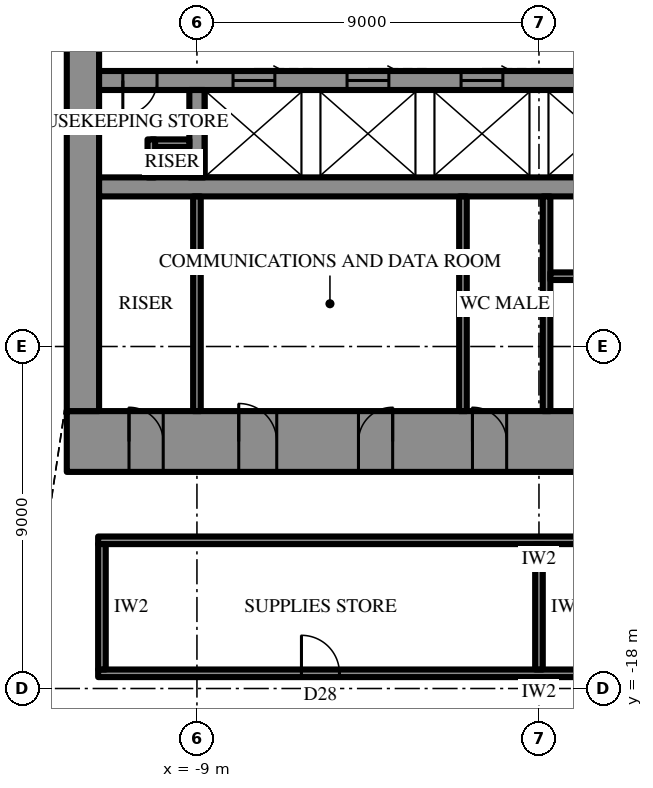
"""IFC4 building model, lengths in metres.
Left out: names, types, materials, properties, quantities, classifications, styles, units other than length and angle.
Written with IfcOpenShell. Run it as: python <this file> out.ifc"""

import sys

from ifc_helpers import new_model, si_unit, direction, frame, frame_2d, origin, place, context, subcontext, project, spatial, rectangle, extrude, element, fill, save


model = new_model("IFC4")
c1 = context("Model", 3, precision=1e-05, world=origin(), true_north=direction((0.0, 1.0)))
c2 = subcontext(c1, "Body", "Model", "MODEL_VIEW")
j1 = project(units=[si_unit("LENGTHUNIT", "METRE"), si_unit("PLANEANGLEUNIT", "RADIAN")], contexts=[c1])
p1 = place(None, origin())
s1 = spatial("IfcSite", under=j1, at=p1, CompositionType="ELEMENT")
p2 = place(p1, origin())
s2 = spatial("IfcBuilding", under=s1, at=p2, CompositionType="ELEMENT")
p3 = place(p2, frame((0.0, 0.0, 349.3)))
s3 = spatial("IfcBuildingStorey", under=s2, at=p3, CompositionType="ELEMENT", Elevation=349.3)
p4 = place(p3, frame((12.425, -11.5, 0.0), z_axis=(0.0, 0.0, 1.0), x_axis=(-1.0, 0.0, 0.0)))
e1 = element("IfcWall", 1, at=p4, inside=s3, PredefinedType="SHEAR", context=c2, shape_type="SweptSolid", body=[
    extrude(rectangle(XDim=24.85, YDim=1.6, at=frame_2d((12.425, 0.0))), origin(), (0.0, 0.0, 1.0), 4.2),
])
p5 = place(p4, frame((13.275, 0.0, 0.0)))
e2 = element("IfcOpeningElement", 2, at=p5, cuts=e1, PredefinedType="OPENING", context=c2, shape_type="SweptSolid", body=[
    extrude(rectangle(XDim=0.9, YDim=2.2, at=frame_2d((0.45, 1.1))), frame((0.0, 0.81, 0.0), z_axis=(0.0, -1.0, 0.0), x_axis=(1.0, 0.0, 0.0)), (0.0, 0.0, 1.0), 1.62),
])
p6 = place(p4, frame((16.275, 0.0, 0.0)))
e3 = element("IfcOpeningElement", 3, at=p6, cuts=e1, PredefinedType="OPENING", context=c2, shape_type="SweptSolid", body=[
    extrude(rectangle(XDim=0.9, YDim=2.2, at=frame_2d((0.45, 1.1))), frame((0.0, 0.81, 0.0), z_axis=(0.0, -1.0, 0.0), x_axis=(1.0, 0.0, 0.0)), (0.0, 0.0, 1.0), 1.62),
])
p7 = place(p4, frame((19.325, 0.0, 0.0)))
e4 = element("IfcOpeningElement", 4, at=p7, cuts=e1, PredefinedType="OPENING", context=c2, shape_type="SweptSolid", body=[
    extrude(rectangle(XDim=1.0, YDim=2.2, at=frame_2d((0.5, 1.1))), frame((0.0, 0.81, 0.0), z_axis=(0.0, -1.0, 0.0), x_axis=(1.0, 0.0, 0.0)), (0.0, 0.0, 1.0), 1.62),
])
p8 = place(p4, frame((1.637, 0.0, 0.0)))
e5 = element("IfcOpeningElement", 5, at=p8, cuts=e1, PredefinedType="OPENING", context=c2, shape_type="SweptSolid", body=[
    extrude(rectangle(XDim=0.9, YDim=2.2, at=frame_2d((0.45, 1.1))), frame((0.0, 0.81, 0.0), z_axis=(0.0, -1.0, 0.0), x_axis=(1.0, 0.0, 0.0)), (0.0, 0.0, 1.0), 1.62),
])
p9 = place(p4, frame((22.312, 0.0, 0.0)))
e6 = element("IfcOpeningElement", 6, at=p9, cuts=e1, PredefinedType="OPENING", context=c2, shape_type="SweptSolid", body=[
    extrude(rectangle(XDim=0.9, YDim=2.2, at=frame_2d((0.45, 1.1))), frame((0.0, 0.81, 0.0), z_axis=(0.0, -1.0, 0.0), x_axis=(1.0, 0.0, 0.0)), (0.0, 0.0, 1.0), 1.62),
])
p10 = place(p3, frame((-12.0, 10.7, 0.0), z_axis=(0.0, 0.0, 1.0), x_axis=(0.0, -1.0, 0.0)))
e7 = element("IfcWall", 7, at=p10, inside=s3, PredefinedType="SHEAR", context=c2, shape_type="SweptSolid", body=[
    extrude(rectangle(XDim=21.4, YDim=0.85, at=frame_2d((10.7, 0.0))), origin(), (0.0, 0.0, 1.0), 4.2),
])
p11 = place(p10, frame((9.8, 0.0, 0.0)))
e8 = element("IfcOpeningElement", 8, at=p11, cuts=e7, PredefinedType="OPENING", context=c2, shape_type="SweptSolid", body=[
    extrude(rectangle(XDim=1.8, YDim=2.4, at=frame_2d((0.9, 1.2))), frame((0.0, 0.435, 0.0), z_axis=(0.0, -1.0, 0.0), x_axis=(1.0, 0.0, 0.0)), (0.0, 0.0, 1.0), 0.87),
])
p12 = place(p3, frame((3.2, -2.0, 0.0), z_axis=(0.0, 0.0, 1.0), x_axis=(-1.0, 0.0, 0.0)))
e9 = element("IfcWall", 9, at=p12, inside=s3, PredefinedType="SHEAR", context=c2, shape_type="SweptSolid", body=[
    extrude(rectangle(XDim=14.775, YDim=0.5, at=frame_2d((7.387, 0.0))), origin(), (0.0, 0.0, 1.0), 4.2),
])
p13 = place(p12, frame((13.25, 0.0, 0.0)))
e10 = element("IfcOpeningElement", 10, at=p13, cuts=e9, PredefinedType="OPENING", context=c2, shape_type="SweptSolid", body=[
    extrude(rectangle(XDim=0.9, YDim=2.2, at=frame_2d((0.45, 1.1))), frame((0.0, 0.26, 0.0), z_axis=(0.0, -1.0, 0.0), x_axis=(1.0, 0.0, 0.0)), (0.0, 0.0, 1.0), 0.52),
])
p14 = place(p12, frame((1.15, 0.0, 0.0)))
e11 = element("IfcOpeningElement", 11, at=p14, cuts=e9, PredefinedType="OPENING", context=c2, shape_type="SweptSolid", body=[
    extrude(rectangle(XDim=1.1, YDim=2.2, at=frame_2d((0.55, 1.1))), frame((0.0, 0.26, 0.0), z_axis=(0.0, -1.0, 0.0), x_axis=(1.0, 0.0, 0.0)), (0.0, 0.0, 1.0), 0.52),
])
p15 = place(p12, frame((4.15, 0.0, 0.0)))
e12 = element("IfcOpeningElement", 12, at=p15, cuts=e9, PredefinedType="OPENING", context=c2, shape_type="SweptSolid", body=[
    extrude(rectangle(XDim=1.1, YDim=2.2, at=frame_2d((0.55, 1.1))), frame((0.0, 0.26, 0.0), z_axis=(0.0, -1.0, 0.0), x_axis=(1.0, 0.0, 0.0)), (0.0, 0.0, 1.0), 0.52),
])
p16 = place(p12, frame((7.15, 0.0, 0.0)))
e13 = element("IfcOpeningElement", 13, at=p16, cuts=e9, PredefinedType="OPENING", context=c2, shape_type="SweptSolid", body=[
    extrude(rectangle(XDim=1.1, YDim=2.2, at=frame_2d((0.55, 1.1))), frame((0.0, 0.26, 0.0), z_axis=(0.0, -1.0, 0.0), x_axis=(1.0, 0.0, 0.0)), (0.0, 0.0, 1.0), 0.52),
])
p17 = place(p12, frame((10.15, 0.0, 0.0)))
e14 = element("IfcOpeningElement", 14, at=p17, cuts=e9, PredefinedType="OPENING", context=c2, shape_type="SweptSolid", body=[
    extrude(rectangle(XDim=1.1, YDim=2.2, at=frame_2d((0.55, 1.1))), frame((0.0, 0.26, 0.0), z_axis=(0.0, -1.0, 0.0), x_axis=(1.0, 0.0, 0.0)), (0.0, 0.0, 1.0), 0.52),
])
p18 = place(p3, frame((11.575, -4.8, 0.0), z_axis=(0.0, 0.0, 1.0), x_axis=(-1.0, 0.0, 0.0)))
e15 = element("IfcWall", 15, at=p18, inside=s3, PredefinedType="SHEAR", context=c2, shape_type="SweptSolid", body=[
    extrude(rectangle(XDim=23.15, YDim=0.5, at=frame_2d((11.575, 0.0))), origin(), (0.0, 0.0, 1.0), 4.2),
])
p19 = place(p18, frame((6.475, 0.0, 0.0)))
e16 = element("IfcOpeningElement", 16, at=p19, cuts=e15, PredefinedType="OPENING", context=c2, shape_type="SweptSolid", body=[
    extrude(rectangle(XDim=1.2, YDim=2.2, at=frame_2d((0.6, 1.1))), frame((0.0, 0.26, 0.0), z_axis=(0.0, -1.0, 0.0), x_axis=(1.0, 0.0, 0.0)), (0.0, 0.0, 1.0), 0.52),
])
p20 = place(p18, frame((3.475, 0.0, 0.0)))
e17 = element("IfcOpeningElement", 17, at=p20, cuts=e15, PredefinedType="OPENING", context=c2, shape_type="SweptSolid", body=[
    extrude(rectangle(XDim=1.2, YDim=2.2, at=frame_2d((0.6, 1.1))), frame((0.0, 0.26, 0.0), z_axis=(0.0, -1.0, 0.0), x_axis=(1.0, 0.0, 0.0)), (0.0, 0.0, 1.0), 0.52),
])
p21 = place(p3, frame((-9.0, -2.25, 0.0), z_axis=(0.0, 0.0, 1.0), x_axis=(0.0, -1.0, 0.0)))
e18 = element("IfcWall", 18, at=p21, inside=s3, PredefinedType="SHEAR", context=c2, shape_type="SweptSolid", body=[
    extrude(rectangle(XDim=2.3, YDim=0.4, at=frame_2d((1.15, 0.0))), origin(), (0.0, 0.0, 1.0), 4.2),
])
p22 = place(p3, frame((0.2, -5.05, 0.0), z_axis=(0.0, 0.0, 1.0), x_axis=(0.0, -1.0, 0.0)))
e19 = element("IfcWall", 19, at=p22, inside=s3, PredefinedType="SHEAR", context=c2, shape_type="SweptSolid", body=[
    extrude(rectangle(XDim=5.65, YDim=0.2, at=frame_2d((2.825, 0.0))), origin(), (0.0, 0.0, 1.0), 4.2),
])
p23 = place(p3, frame((8.9, -7.15, 0.0), z_axis=(0.0, 0.0, 1.0), x_axis=(-1.0, 0.0, 0.0)))
e20 = element("IfcWall", 20, at=p23, inside=s3, PredefinedType="SHEAR", context=c2, shape_type="SweptSolid", body=[
    extrude(rectangle(XDim=8.6, YDim=0.2, at=frame_2d((4.3, 0.0))), origin(), (0.0, 0.0, 1.0), 4.2),
])
p24 = place(p23, frame((0.3, 0.0, 0.0)))
e21 = element("IfcOpeningElement", 21, at=p24, cuts=e20, PredefinedType="OPENING", context=c2, shape_type="SweptSolid", body=[
    extrude(rectangle(XDim=1.0, YDim=2.2, at=frame_2d((0.5, 1.1))), frame((0.0, 0.11, 0.0), z_axis=(0.0, -1.0, 0.0), x_axis=(1.0, 0.0, 0.0)), (0.0, 0.0, 1.0), 0.22),
])
for number, where, z_axis, x_axis in (
    (22, (-9.0, -5.05, 0.0), (0.0, 0.0, 1.0), (0.0, -1.0, 0.0)),
    (23, (-2.0, -5.05, 0.0), (0.0, 0.0, 1.0), (0.0, -1.0, 0.0)),
):
    element("IfcWall", number, at=place(p3, frame(where, z_axis=z_axis, x_axis=x_axis)), inside=s3, PredefinedType="PARTITIONING", context=c2, shape_type="SweptSolid", body=[
        extrude(rectangle(XDim=5.65, YDim=0.2, at=frame_2d((2.825, 0.0))), origin(), (0.0, 0.0, 1.0), 4.0),
    ])
for number, where, z_axis, x_axis in (
    (24, (-9.2, -3.65, 0.0), (0.0, 0.0, 1.0), (-1.0, 0.0, 0.0)),
    (25, (-10.2, -3.55, 0.0), (0.0, 0.0, 1.0), (0.0, -1.0, 0.0)),
):
    element("IfcWall", number, at=place(p3, frame(where, z_axis=z_axis, x_axis=x_axis)), inside=s3, PredefinedType="PARTITIONING", context=c2, shape_type="SweptSolid", body=[
        extrude(rectangle(XDim=1.0, YDim=0.2, at=frame_2d((0.5, 0.0))), origin(), (0.0, 0.0, 1.0), 4.0),
    ])
p25 = place(p3, frame((11.6, -14.1, 0.0), z_axis=(0.0, 0.0, 1.0), x_axis=(-1.0, 0.0, 0.0)))
e26 = element("IfcWall", 26, at=p25, inside=s3, PredefinedType="PARTITIONING", context=c2, shape_type="SweptSolid", body=[
    extrude(rectangle(XDim=23.2, YDim=0.2, at=frame_2d((11.6, 0.0))), origin(), (0.0, 0.0, 1.0), 4.0),
])
p26 = place(p3, frame((11.6, -17.6, 0.0), z_axis=(0.0, 0.0, 1.0), x_axis=(-1.0, 0.0, 0.0)))
e27 = element("IfcWall", 27, at=p26, inside=s3, PredefinedType="PARTITIONING", context=c2, shape_type="SweptSolid", body=[
    extrude(rectangle(XDim=23.2, YDim=0.2, at=frame_2d((11.6, 0.0))), origin(), (0.0, 0.0, 1.0), 4.0),
])
p27 = place(p26, frame((5.35, 0.0, 0.0)))
e28 = element("IfcOpeningElement", 28, at=p27, cuts=e27, PredefinedType="OPENING", context=c2, shape_type="SweptSolid", body=[
    extrude(rectangle(XDim=1.0, YDim=2.2, at=frame_2d((0.5, 1.1))), frame((0.0, 0.11, 0.0), z_axis=(0.0, -1.0, 0.0), x_axis=(1.0, 0.0, 0.0)), (0.0, 0.0, 1.0), 0.22),
])
p28 = place(p26, frame((16.85, 0.0, 0.0)))
e29 = element("IfcOpeningElement", 29, at=p28, cuts=e27, PredefinedType="OPENING", context=c2, shape_type="SweptSolid", body=[
    extrude(rectangle(XDim=1.0, YDim=2.2, at=frame_2d((0.5, 1.1))), frame((0.0, 0.11, 0.0), z_axis=(0.0, -1.0, 0.0), x_axis=(1.0, 0.0, 0.0)), (0.0, 0.0, 1.0), 0.22),
])
p29 = place(p3, frame((0.0, -14.2, 0.0), z_axis=(0.0, 0.0, 1.0), x_axis=(0.0, -1.0, 0.0)))
e30 = element("IfcWall", 30, at=p29, inside=s3, PredefinedType="PARTITIONING", context=c2, shape_type="SweptSolid", body=[
    extrude(rectangle(XDim=3.3, YDim=0.2, at=frame_2d((1.65, 0.0))), origin(), (0.0, 0.0, 1.0), 2.992),
])
p30 = place(p3, frame((-11.5, -14.2, 0.0), z_axis=(0.0, 0.0, 1.0), x_axis=(0.0, -1.0, 0.0)))
e31 = element("IfcWall", 31, at=p30, inside=s3, PredefinedType="PARTITIONING", context=c2, shape_type="SweptSolid", body=[
    extrude(rectangle(XDim=3.3, YDim=0.2, at=frame_2d((1.65, 0.0))), origin(), (0.0, 0.0, 1.0), 4.0),
])
p31 = place(p5, frame((0.9, 0.0, 0.0), z_axis=(0.0, 0.0, 1.0), x_axis=(-1.0, 0.0, 0.0)))
e32 = element("IfcDoor", 32, at=p31, inside=s3, OperationType="SINGLE_SWING_RIGHT", PredefinedType="DOOR", context=c2, shape_type="SweptSolid", body=[
    extrude(rectangle(XDim=0.9, YDim=2.2, at=frame_2d((0.45, 1.1))), frame((0.0, 0.025, 0.0), z_axis=(0.0, -1.0, 0.0), x_axis=(1.0, 0.0, 0.0)), (0.0, 0.0, 1.0), 0.05),
])
fill(e2, e32)
p32 = place(p6, frame((0.9, 0.0, 0.0), z_axis=(0.0, 0.0, 1.0), x_axis=(-1.0, 0.0, 0.0)))
e33 = element("IfcDoor", 33, at=p32, inside=s3, OperationType="SINGLE_SWING_LEFT", PredefinedType="DOOR", context=c2, shape_type="SweptSolid", body=[
    extrude(rectangle(XDim=0.9, YDim=2.2, at=frame_2d((0.45, 1.1))), frame((0.0, 0.025, 0.0), z_axis=(0.0, -1.0, 0.0), x_axis=(1.0, 0.0, 0.0)), (0.0, 0.0, 1.0), 0.05),
])
fill(e3, e33)
p33 = place(p7, frame((1.0, 0.0, 0.0), z_axis=(0.0, 0.0, 1.0), x_axis=(-1.0, 0.0, 0.0)))
e34 = element("IfcDoor", 34, at=p33, inside=s3, OperationType="SINGLE_SWING_RIGHT", PredefinedType="DOOR", context=c2, shape_type="SweptSolid", body=[
    extrude(rectangle(XDim=1.0, YDim=2.2, at=frame_2d((0.5, 1.1))), frame((0.0, 0.025, 0.0), z_axis=(0.0, -1.0, 0.0), x_axis=(1.0, 0.0, 0.0)), (0.0, 0.0, 1.0), 0.05),
])
fill(e4, e34)
p34 = place(p9, frame((0.9, 0.0, 0.0), z_axis=(0.0, 0.0, 1.0), x_axis=(-1.0, 0.0, 0.0)))
e35 = element("IfcDoor", 35, at=p34, inside=s3, OperationType="SINGLE_SWING_RIGHT", PredefinedType="DOOR", context=c2, shape_type="SweptSolid", body=[
    extrude(rectangle(XDim=0.9, YDim=2.2, at=frame_2d((0.45, 1.1))), frame((0.0, 0.025, 0.0), z_axis=(0.0, -1.0, 0.0), x_axis=(1.0, 0.0, 0.0)), (0.0, 0.0, 1.0), 0.05),
])
fill(e6, e35)
p35 = place(p13, origin())
e36 = element("IfcDoor", 36, at=p35, inside=s3, OperationType="SINGLE_SWING_LEFT", PredefinedType="DOOR", context=c2, shape_type="SweptSolid", body=[
    extrude(rectangle(XDim=0.9, YDim=2.2, at=frame_2d((0.45, 1.1))), frame((0.0, 0.025, 0.0), z_axis=(0.0, -1.0, 0.0), x_axis=(1.0, 0.0, 0.0)), (0.0, 0.0, 1.0), 0.05),
])
fill(e10, e36)
p36 = place(p15, frame((1.1, 0.0, 0.0), z_axis=(0.0, 0.0, 1.0), x_axis=(-1.0, 0.0, 0.0)))
e37 = element("IfcDoor", 37, at=p36, inside=s3, OperationType="SLIDING_TO_LEFT", PredefinedType="DOOR", context=c2, shape_type="SweptSolid", body=[
    extrude(rectangle(XDim=1.1, YDim=2.2, at=frame_2d((0.55, 1.1))), frame((0.0, 0.025, 0.0), z_axis=(0.0, -1.0, 0.0), x_axis=(1.0, 0.0, 0.0)), (0.0, 0.0, 1.0), 0.05),
])
fill(e12, e37)
p37 = place(p16, frame((1.1, 0.0, 0.0), z_axis=(0.0, 0.0, 1.0), x_axis=(-1.0, 0.0, 0.0)))
e38 = element("IfcDoor", 38, at=p37, inside=s3, OperationType="SLIDING_TO_LEFT", PredefinedType="DOOR", context=c2, shape_type="SweptSolid", body=[
    extrude(rectangle(XDim=1.1, YDim=2.2, at=frame_2d((0.55, 1.1))), frame((0.0, 0.025, 0.0), z_axis=(0.0, -1.0, 0.0), x_axis=(1.0, 0.0, 0.0)), (0.0, 0.0, 1.0), 0.05),
])
fill(e13, e38)
p38 = place(p17, frame((1.1, 0.0, 0.0), z_axis=(0.0, 0.0, 1.0), x_axis=(-1.0, 0.0, 0.0)))
e39 = element("IfcDoor", 39, at=p38, inside=s3, OperationType="SLIDING_TO_LEFT", PredefinedType="DOOR", context=c2, shape_type="SweptSolid", body=[
    extrude(rectangle(XDim=1.1, YDim=2.2, at=frame_2d((0.55, 1.1))), frame((0.0, 0.025, 0.0), z_axis=(0.0, -1.0, 0.0), x_axis=(1.0, 0.0, 0.0)), (0.0, 0.0, 1.0), 0.05),
])
fill(e14, e39)
p39 = place(p28, frame((1.0, 0.0, 0.0), z_axis=(0.0, 0.0, 1.0), x_axis=(-1.0, 0.0, 0.0)))
e40 = element("IfcDoor", 40, at=p39, inside=s3, OperationType="SINGLE_SWING_RIGHT", PredefinedType="DOOR", context=c2, shape_type="SweptSolid", body=[
    extrude(rectangle(XDim=1.0, YDim=2.2, at=frame_2d((0.5, 1.1))), frame((0.0, 0.025, 0.0), z_axis=(0.0, -1.0, 0.0), x_axis=(1.0, 0.0, 0.0)), (0.0, 0.0, 1.0), 0.05),
])
fill(e29, e40)
save(model, sys.argv[1])
